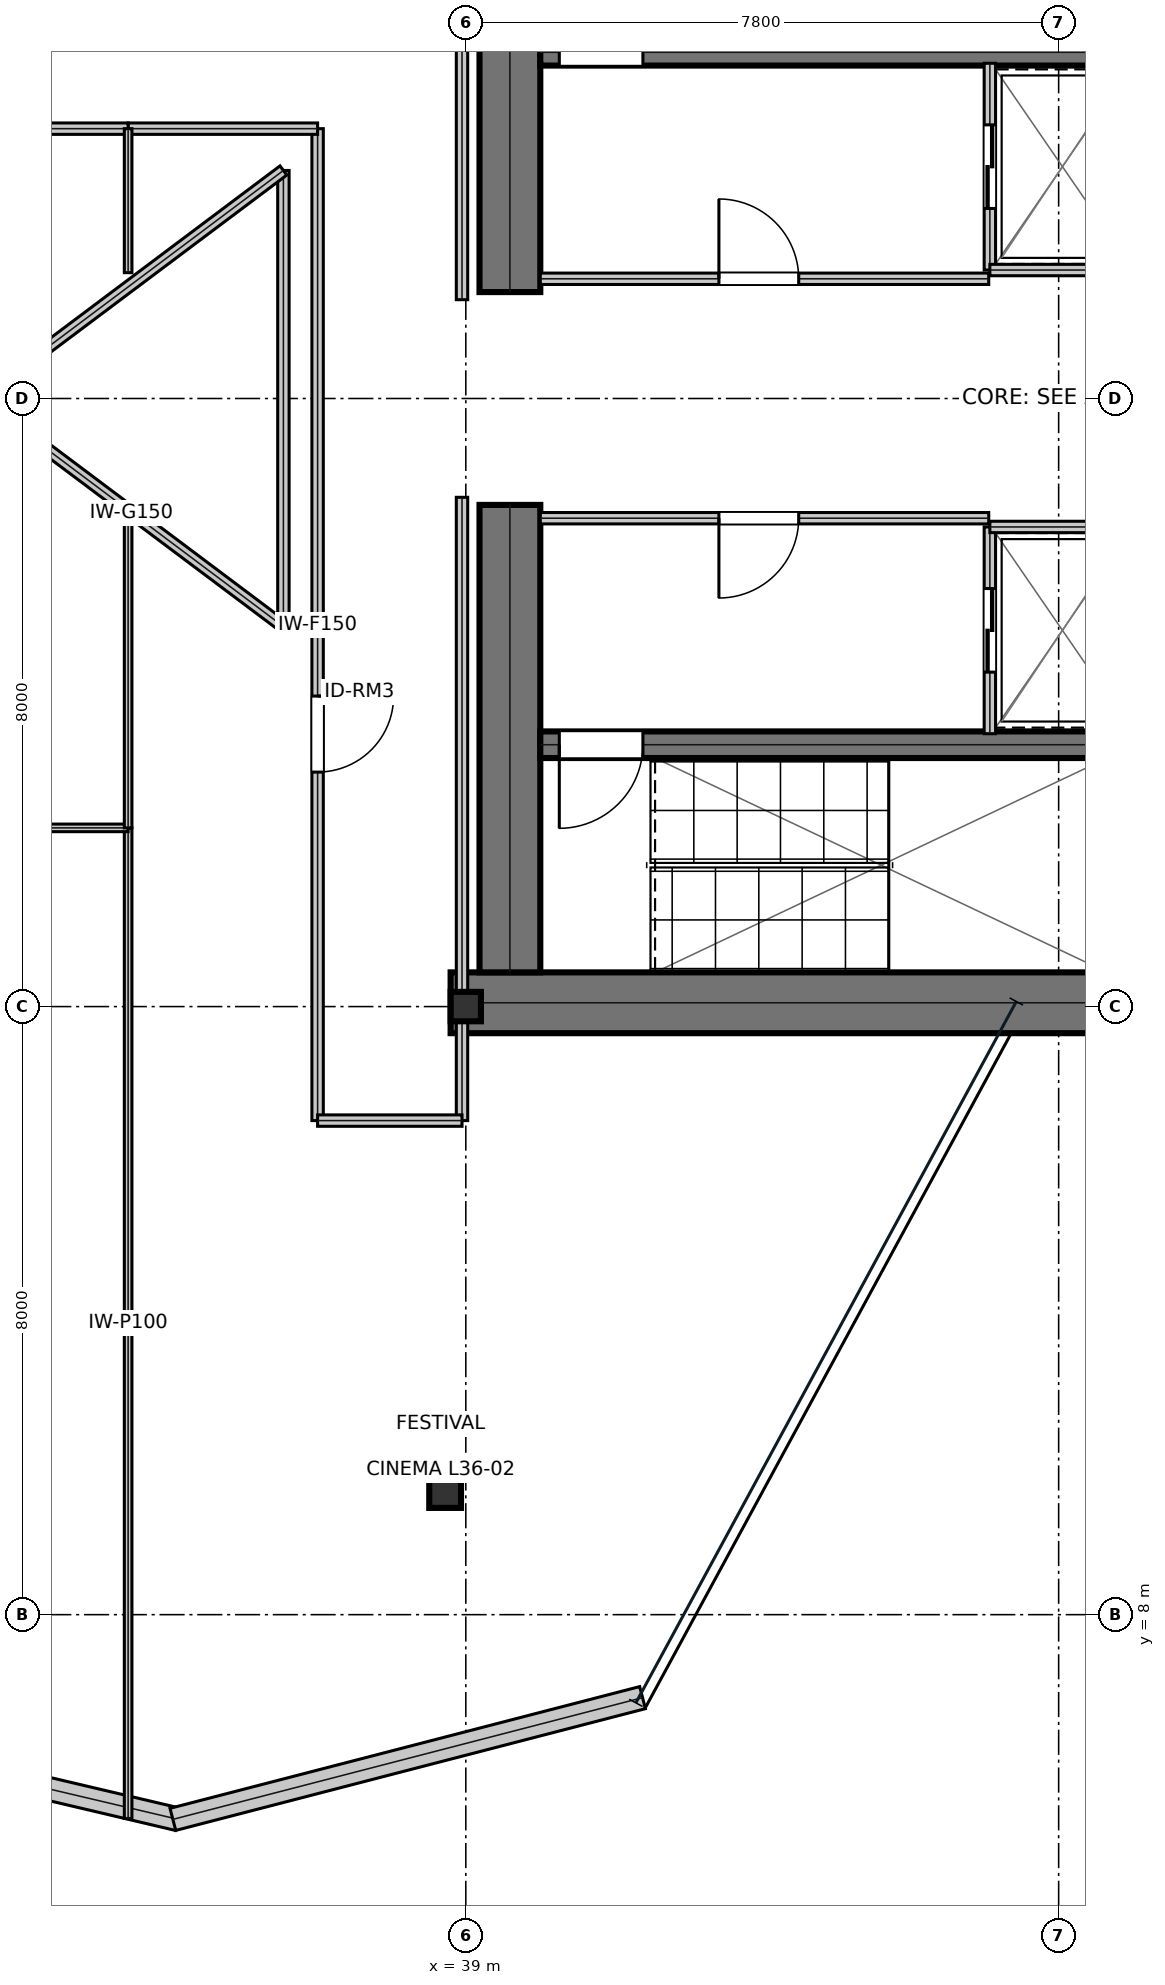
"""IFC4 building model, lengths in metres.
Left out: names, types, materials, properties, quantities, classifications, styles, units other than length and angle.
Written with IfcOpenShell. Run it as: python <this file> out.ifc"""

import sys

from ifc_helpers import new_model, si_unit, direction, frame, frame_2d, origin, origin_2d, place, context, subcontext, project, spatial, rectangle, i_section, extrude, element, fill, save


model = new_model("IFC4")
c1 = context("Model", 3, precision=1e-05, world=origin(), true_north=direction((0.0, 1.0)))
c2 = subcontext(c1, "Body", "Model", "MODEL_VIEW")
j1 = project(units=[si_unit("LENGTHUNIT", "METRE"), si_unit("PLANEANGLEUNIT", "RADIAN")], contexts=[c1])
p1 = place(None, origin())
s1 = spatial("IfcSite", under=j1, at=p1, CompositionType="ELEMENT")
p2 = place(p1, origin())
s2 = spatial("IfcBuilding", under=s1, at=p2, CompositionType="ELEMENT")
p3 = place(p2, frame((0.0, 0.0, 157.35)))
s3 = spatial("IfcBuildingStorey", under=s2, at=p3, CompositionType="ELEMENT", Elevation=157.35)
p4 = place(p3, frame((38.8, 16.05, 0.0), z_axis=(0.0, 0.0, 1.0), x_axis=(1.0, 0.0, 0.0)))
e1 = element("IfcWall", 1, at=p4, inside=s3, PredefinedType="SHEAR", context=c2, shape_type="SweptSolid", body=[
    extrude(rectangle(XDim=16.0, YDim=0.8, at=frame_2d((8.0, 0.0))), origin(), (0.0, 0.0, 1.0), 3.81),
])
for number, where, z_axis, x_axis in (
    (2, (39.58, 16.45, 0.0), (0.0, 0.0, 1.0), (0.0, 1.0, 0.0)),
    (3, (39.58, 25.4, 0.0), (0.0, 0.0, 1.0), (0.0, 1.0, 0.0)),
):
    element("IfcWall", number, at=place(p3, frame(where, z_axis=z_axis, x_axis=x_axis)), inside=s3, PredefinedType="SHEAR", context=c2, shape_type="SweptSolid", body=[
        extrude(rectangle(XDim=6.15, YDim=0.8, at=frame_2d((3.075, 0.0))), origin(), (0.0, 0.0, 1.0), 3.81),
    ])
p5 = place(p3, frame((39.98, 28.555, 0.0), z_axis=(0.0, 0.0, 1.0), x_axis=(1.0, 0.0, 0.0)))
e4 = element("IfcWall", 4, at=p5, inside=s3, PredefinedType="SHEAR", context=c2, shape_type="SweptSolid", body=[
    extrude(rectangle(XDim=7.71, YDim=0.35, at=frame_2d((3.855, 0.0))), origin(), (0.0, 0.0, 1.0), 3.81),
])
p6 = place(p5, frame((0.25, 0.0, 0.0)))
e5 = element("IfcOpeningElement", 5, at=p6, cuts=e4, PredefinedType="OPENING", context=c2, shape_type="SweptSolid", body=[
    extrude(rectangle(XDim=1.1, YDim=2.15, at=frame_2d((0.55, 1.075))), frame((0.0, 0.185, 0.0), z_axis=(0.0, -1.0, 0.0), x_axis=(1.0, 0.0, 0.0)), (0.0, 0.0, 1.0), 0.37),
])
p7 = place(p3, frame((39.98, 19.445, 0.0), z_axis=(0.0, 0.0, 1.0), x_axis=(1.0, 0.0, 0.0)))
e6 = element("IfcWall", 6, at=p7, inside=s3, PredefinedType="SHEAR", context=c2, shape_type="SweptSolid", body=[
    extrude(rectangle(XDim=7.71, YDim=0.35, at=frame_2d((3.855, 0.0))), origin(), (0.0, 0.0, 1.0), 3.81),
])
p8 = place(p7, frame((0.25, 0.0, 0.0)))
e7 = element("IfcOpeningElement", 7, at=p8, cuts=e6, PredefinedType="OPENING", context=c2, shape_type="SweptSolid", body=[
    extrude(rectangle(XDim=1.1, YDim=2.15, at=frame_2d((0.55, 1.075))), frame((0.0, 0.185, 0.0), z_axis=(0.0, -1.0, 0.0), x_axis=(1.0, 0.0, 0.0)), (0.0, 0.0, 1.0), 0.37),
])
p9 = place(p3, frame((39.0, 16.0, 0.0), z_axis=(0.0, 0.0, 1.0), x_axis=(1.0, 0.0, 0.0)))
e8 = element("IfcColumn", 8, at=p9, inside=s3, PredefinedType="COLUMN", context=c2, shape_type="SweptSolid", body=[
    extrude(i_section(OverallWidth=0.398, OverallDepth=0.387, WebThickness=0.021, FlangeThickness=0.033, at=origin_2d()), origin(), (0.0, 0.0, 1.0), 4.044),
])
p10 = place(p3, frame((38.728, 9.632, 0.016), z_axis=(-0.004494627579, 0.026846289054, 0.999629468897), x_axis=(-0.986273042842, -0.165122636132, 0.0)))
e9 = element("IfcColumn", 9, at=p10, inside=s3, PredefinedType="COLUMN", context=c2, shape_type="SweptSolid", body=[
    extrude(i_section(OverallWidth=0.418, OverallDepth=0.455, WebThickness=0.042, FlangeThickness=0.068, at=origin_2d()), origin(), (0.0, 0.0, 1.0), 4.02),
])
p11 = place(p3, frame((29.033, 6.763, 0.0), z_axis=(0.0, 0.0, 1.0), x_axis=(0.973355101444, -0.229302957882, 0.0)))
e10 = element("IfcWall", 10, at=p11, inside=s3, PredefinedType="STANDARD", context=c2, shape_type="SweptSolid", body=[
    extrude(rectangle(XDim=6.349, YDim=0.3, at=frame_2d((3.174, 0.0))), origin(), (0.0, 0.0, 1.0), 3.81),
])
p12 = place(p3, frame((35.146, 5.307, 0.0), z_axis=(0.0, 0.0, 1.0), x_axis=(0.96801891639, 0.250877216005, 0.0)))
e11 = element("IfcWall", 11, at=p12, inside=s3, PredefinedType="STANDARD", context=c2, shape_type="SweptSolid", body=[
    extrude(rectangle(XDim=6.384, YDim=0.3, at=frame_2d((3.192, 0.0))), origin(), (0.0, 0.0, 1.0), 3.81),
])
p13 = place(p3, frame((39.98, 25.575, 0.0), z_axis=(0.0, 0.0, 1.0), x_axis=(1.0, 0.0, 0.0)))
e12 = element("IfcWall", 12, at=p13, inside=s3, PredefinedType="PARTITIONING", context=c2, shape_type="SweptSolid", body=[
    extrude(rectangle(XDim=5.9, YDim=0.15, at=frame_2d((2.95, 0.0))), origin(), (0.0, 0.0, 1.0), 3.81),
])
p14 = place(p13, frame((2.35, 0.0, 0.0)))
e13 = element("IfcOpeningElement", 13, at=p14, cuts=e12, PredefinedType="OPENING", context=c2, shape_type="SweptSolid", body=[
    extrude(rectangle(XDim=1.05, YDim=2.15, at=frame_2d((0.525, 1.075))), frame((0.0, 0.085, 0.0), z_axis=(0.0, -1.0, 0.0), x_axis=(1.0, 0.0, 0.0)), (0.0, 0.0, 1.0), 0.17),
])
p15 = place(p3, frame((39.98, 22.425, 0.0), z_axis=(0.0, 0.0, 1.0), x_axis=(1.0, 0.0, 0.0)))
e14 = element("IfcWall", 14, at=p15, inside=s3, PredefinedType="PARTITIONING", context=c2, shape_type="SweptSolid", body=[
    extrude(rectangle(XDim=5.9, YDim=0.15, at=frame_2d((2.95, 0.0))), origin(), (0.0, 0.0, 1.0), 3.81),
])
p16 = place(p15, frame((2.35, 0.0, 0.0)))
e15 = element("IfcOpeningElement", 15, at=p16, cuts=e14, PredefinedType="OPENING", context=c2, shape_type="SweptSolid", body=[
    extrude(rectangle(XDim=1.05, YDim=2.15, at=frame_2d((0.525, 1.075))), frame((0.0, 0.085, 0.0), z_axis=(0.0, -1.0, 0.0), x_axis=(1.0, 0.0, 0.0)), (0.0, 0.0, 1.0), 0.17),
])
p17 = place(p3, frame((45.895, 25.69, 0.0), z_axis=(0.0, 0.0, 1.0), x_axis=(0.0, 1.0, 0.0)))
e16 = element("IfcWall", 16, at=p17, inside=s3, PredefinedType="PARTITIONING", context=c2, shape_type="SweptSolid", body=[
    extrude(rectangle(XDim=2.72, YDim=0.15, at=frame_2d((1.36, 0.0))), origin(), (0.0, 0.0, 1.0), 3.81),
])
p18 = place(p17, frame((0.81, 0.0, 0.0)))
e17 = element("IfcOpeningElement", 17, at=p18, cuts=e16, PredefinedType="OPENING", context=c2, shape_type="SweptSolid", body=[
    extrude(rectangle(XDim=1.1, YDim=2.15, at=frame_2d((0.55, 1.075))), frame((0.0, 0.085, 0.0), z_axis=(0.0, -1.0, 0.0), x_axis=(1.0, 0.0, 0.0)), (0.0, 0.0, 1.0), 0.17),
])
p19 = place(p3, frame((45.895, 25.69, 0.0), z_axis=(0.0, 0.0, 1.0), x_axis=(1.0, 0.0, 0.0)))
e18 = element("IfcWall", 18, at=p19, inside=s3, PredefinedType="PARTITIONING", context=c2, shape_type="SweptSolid", body=[
    extrude(rectangle(XDim=1.915, YDim=0.15, at=frame_2d((0.958, 0.0))), origin(), (0.0, 0.0, 1.0), 3.81),
])
p20 = place(p3, frame((45.895, 19.59, 0.0), z_axis=(0.0, 0.0, 1.0), x_axis=(0.0, 1.0, 0.0)))
e19 = element("IfcWall", 19, at=p20, inside=s3, PredefinedType="PARTITIONING", context=c2, shape_type="SweptSolid", body=[
    extrude(rectangle(XDim=2.72, YDim=0.15, at=frame_2d((1.36, 0.0))), origin(), (0.0, 0.0, 1.0), 3.81),
])
p21 = place(p20, frame((0.81, 0.0, 0.0)))
e20 = element("IfcOpeningElement", 20, at=p21, cuts=e19, PredefinedType="OPENING", context=c2, shape_type="SweptSolid", body=[
    extrude(rectangle(XDim=1.1, YDim=2.15, at=frame_2d((0.55, 1.075))), frame((0.0, 0.085, 0.0), z_axis=(0.0, -1.0, 0.0), x_axis=(1.0, 0.0, 0.0)), (0.0, 0.0, 1.0), 0.17),
])
p22 = place(p3, frame((45.895, 22.31, 0.0), z_axis=(0.0, 0.0, 1.0), x_axis=(1.0, 0.0, 0.0)))
e21 = element("IfcWall", 21, at=p22, inside=s3, PredefinedType="PARTITIONING", context=c2, shape_type="SweptSolid", body=[
    extrude(rectangle(XDim=1.915, YDim=0.15, at=frame_2d((0.958, 0.0))), origin(), (0.0, 0.0, 1.0), 3.81),
])
p23 = place(p3, frame((37.05, 14.5, 0.0), z_axis=(0.0, 0.0, 1.0), x_axis=(0.0, 1.0, 0.0)))
e22 = element("IfcWall", 22, at=p23, inside=s3, PredefinedType="PARTITIONING", context=c2, shape_type="SweptSolid", body=[
    extrude(rectangle(XDim=13.05, YDim=0.15, at=frame_2d((6.525, 0.0))), origin(), (0.0, 0.0, 1.0), 3.19),
])
p24 = place(p23, frame((4.585, 0.0, 0.0)))
e23 = element("IfcOpeningElement", 23, at=p24, cuts=e22, PredefinedType="OPENING", context=c2, shape_type="SweptSolid", body=[
    extrude(rectangle(XDim=1.0, YDim=2.15, at=frame_2d((0.5, 1.075))), frame((0.0, 0.085, 0.0), z_axis=(0.0, -1.0, 0.0), x_axis=(1.0, 0.0, 0.0)), (0.0, 0.0, 1.0), 0.17),
])
p25 = place(p3, frame((38.95, 14.5, 0.0), z_axis=(0.0, 0.0, 1.0), x_axis=(0.0, 1.0, 0.0)))
e24 = element("IfcWall", 24, at=p25, inside=s3, PredefinedType="PARTITIONING", context=c2, shape_type="SweptSolid", body=[
    extrude(rectangle(XDim=8.2, YDim=0.15, at=frame_2d((4.1, 0.0))), origin(), (0.0, 0.0, 1.0), 3.19),
])
p26 = place(p3, frame((34.557, 27.55, 0.0), z_axis=(0.0, 0.0, 1.0), x_axis=(1.0, 0.0, 0.0)))
e25 = element("IfcWall", 25, at=p26, inside=s3, PredefinedType="PARTITIONING", context=c2, shape_type="SweptSolid", body=[
    extrude(rectangle(XDim=2.493, YDim=0.15, at=frame_2d((1.247, 0.0))), origin(), (0.0, 0.0, 1.0), 3.443),
])
p27 = place(p3, frame((37.05, 14.5, 0.0), z_axis=(0.0, 0.0, 1.0), x_axis=(1.0, 0.0, 0.0)))
e26 = element("IfcWall", 26, at=p27, inside=s3, PredefinedType="PARTITIONING", context=c2, shape_type="SweptSolid", body=[
    extrude(rectangle(XDim=1.9, YDim=0.15, at=frame_2d((0.95, 0.0))), origin(), (0.0, 0.0, 1.0), 3.19),
])
p28 = place(p3, frame((29.4, 27.55, 0.0), z_axis=(0.0, 0.0, 1.0), x_axis=(1.0, 0.0, 0.0)))
e27 = element("IfcWall", 27, at=p28, inside=s3, PredefinedType="PARTITIONING", context=c2, shape_type="SweptSolid", body=[
    extrude(rectangle(XDim=5.157, YDim=0.15, at=frame_2d((2.579, 0.0))), origin(), (0.0, 0.0, 1.0), 3.19),
])
p29 = place(p3, frame((38.95, 25.3, 0.0), z_axis=(0.0, 0.0, 1.0), x_axis=(0.0, 1.0, 0.0)))
e28 = element("IfcWall", 28, at=p29, inside=s3, PredefinedType="PARTITIONING", context=c2, shape_type="SweptSolid", body=[
    extrude(rectangle(XDim=8.2, YDim=0.15, at=frame_2d((4.1, 0.0))), origin(), (0.0, 0.0, 1.0), 3.19),
])
p30 = place(p3, frame((34.557, 5.318, 0.0), z_axis=(0.0, 0.0, 1.0), x_axis=(0.0, 1.0, 0.0)))
e29 = element("IfcWall", 29, at=p30, inside=s3, PredefinedType="PARTITIONING", context=c2, shape_type="SweptSolid", body=[
    extrude(rectangle(XDim=13.033, YDim=0.1, at=frame_2d((6.517, 0.0))), origin(), (0.0, 0.0, 1.0), 3.19),
])
p31 = place(p3, frame((29.4, 18.351, 0.0), z_axis=(0.0, 0.0, 1.0), x_axis=(1.0, 0.0, 0.0)))
e30 = element("IfcWall", 30, at=p31, inside=s3, PredefinedType="PARTITIONING", context=c2, shape_type="SweptSolid", body=[
    extrude(rectangle(XDim=5.157, YDim=0.1, at=frame_2d((2.579, 0.0))), origin(), (0.0, 0.0, 1.0), 3.19),
])
p32 = place(p3, frame((34.557, 18.351, 0.0), z_axis=(0.0, 0.0, 1.0), x_axis=(0.0, 1.0, 0.0)))
e31 = element("IfcWall", 31, at=p32, inside=s3, PredefinedType="PARTITIONING", context=c2, shape_type="SweptSolid", body=[
    extrude(rectangle(XDim=3.994, YDim=0.1, at=frame_2d((1.997, 0.0))), origin(), (0.0, 0.0, 1.0), 3.81),
])
p33 = place(p3, frame((34.557, 25.655, 0.0), z_axis=(0.0, 0.0, 1.0), x_axis=(0.0, 1.0, 0.0)))
e32 = element("IfcWall", 32, at=p33, inside=s3, PredefinedType="PARTITIONING", context=c2, shape_type="SweptSolid", body=[
    extrude(rectangle(XDim=1.895, YDim=0.1, at=frame_2d((0.947, 0.0))), origin(), (0.0, 0.0, 1.0), 3.81),
])
p34 = place(p3, frame((32.6, 24.0, 0.0), z_axis=(0.0, 0.0, 1.0), x_axis=(0.8, -0.6, 0.0)))
e33 = element("IfcWall", 33, at=p34, inside=s3, PredefinedType="MOVABLE", context=c2, shape_type="SweptSolid", body=[
    extrude(rectangle(XDim=5.0, YDim=0.15, at=frame_2d((2.5, 0.0))), origin(), (0.0, 0.0, 1.0), 3.81),
])
p35 = place(p3, frame((36.6, 21.0, 0.0), z_axis=(0.0, 0.0, 1.0), x_axis=(0.0, 1.0, 0.0)))
e34 = element("IfcWall", 34, at=p35, inside=s3, PredefinedType="MOVABLE", context=c2, shape_type="SweptSolid", body=[
    extrude(rectangle(XDim=6.0, YDim=0.15, at=frame_2d((3.0, 0.0))), origin(), (0.0, 0.0, 1.0), 3.81),
])
p36 = place(p3, frame((36.6, 27.0, 0.0), z_axis=(0.0, 0.0, 1.0), x_axis=(-0.8, -0.6, 0.0)))
e35 = element("IfcWall", 35, at=p36, inside=s3, PredefinedType="MOVABLE", context=c2, shape_type="SweptSolid", body=[
    extrude(rectangle(XDim=5.0, YDim=0.15, at=frame_2d((2.5, 0.0))), origin(), (0.0, 0.0, 1.0), 3.81),
])
p37 = place(p14, origin())
e36 = element("IfcDoor", 36, at=p37, inside=s3, OperationType="SINGLE_SWING_LEFT", PredefinedType="DOOR", context=c2, shape_type="SweptSolid", body=[
    extrude(rectangle(XDim=1.05, YDim=2.15, at=frame_2d((0.525, 1.075))), frame((0.0, 0.025, 0.0), z_axis=(0.0, -1.0, 0.0), x_axis=(1.0, 0.0, 0.0)), (0.0, 0.0, 1.0), 0.05),
])
fill(e13, e36)
p38 = place(p16, frame((1.05, 0.0, 0.0), z_axis=(0.0, 0.0, 1.0), x_axis=(-1.0, 0.0, 0.0)))
e37 = element("IfcDoor", 37, at=p38, inside=s3, OperationType="SINGLE_SWING_RIGHT", PredefinedType="DOOR", context=c2, shape_type="SweptSolid", body=[
    extrude(rectangle(XDim=1.05, YDim=2.15, at=frame_2d((0.525, 1.075))), frame((0.0, 0.025, 0.0), z_axis=(0.0, -1.0, 0.0), x_axis=(1.0, 0.0, 0.0)), (0.0, 0.0, 1.0), 0.05),
])
fill(e15, e37)
p39 = place(p18, frame((1.1, 0.0, 0.0), z_axis=(0.0, 0.0, 1.0), x_axis=(-1.0, 0.0, 0.0)))
e38 = element("IfcDoor", 38, at=p39, inside=s3, OperationType="DOUBLE_DOOR_SLIDING", PredefinedType="DOOR", context=c2, shape_type="SweptSolid", body=[
    extrude(rectangle(XDim=1.1, YDim=2.15, at=frame_2d((0.55, 1.075))), frame((0.0, 0.025, 0.0), z_axis=(0.0, -1.0, 0.0), x_axis=(1.0, 0.0, 0.0)), (0.0, 0.0, 1.0), 0.05),
])
fill(e17, e38)
p40 = place(p21, frame((1.1, 0.0, 0.0), z_axis=(0.0, 0.0, 1.0), x_axis=(-1.0, 0.0, 0.0)))
e39 = element("IfcDoor", 39, at=p40, inside=s3, OperationType="DOUBLE_DOOR_SLIDING", PredefinedType="DOOR", context=c2, shape_type="SweptSolid", body=[
    extrude(rectangle(XDim=1.1, YDim=2.15, at=frame_2d((0.55, 1.075))), frame((0.0, 0.025, 0.0), z_axis=(0.0, -1.0, 0.0), x_axis=(1.0, 0.0, 0.0)), (0.0, 0.0, 1.0), 0.05),
])
fill(e20, e39)
p41 = place(p24, frame((1.0, 0.0, 0.0), z_axis=(0.0, 0.0, 1.0), x_axis=(-1.0, 0.0, 0.0)))
e40 = element("IfcDoor", 40, at=p41, inside=s3, OperationType="SINGLE_SWING_LEFT", PredefinedType="DOOR", context=c2, shape_type="SweptSolid", body=[
    extrude(rectangle(XDim=1.0, YDim=2.15, at=frame_2d((0.5, 1.075))), frame((0.0, 0.025, 0.0), z_axis=(0.0, -1.0, 0.0), x_axis=(1.0, 0.0, 0.0)), (0.0, 0.0, 1.0), 0.05),
])
fill(e23, e40)
p42 = place(p6, origin())
e41 = element("IfcDoor", 41, at=p42, inside=s3, OperationType="SINGLE_SWING_LEFT", PredefinedType="DOOR", context=c2, shape_type="SweptSolid", body=[
    extrude(rectangle(XDim=1.1, YDim=2.15, at=frame_2d((0.55, 1.075))), frame((0.0, 0.025, 0.0), z_axis=(0.0, -1.0, 0.0), x_axis=(1.0, 0.0, 0.0)), (0.0, 0.0, 1.0), 0.05),
])
fill(e5, e41)
p43 = place(p8, frame((1.1, 0.0, 0.0), z_axis=(0.0, 0.0, 1.0), x_axis=(-1.0, 0.0, 0.0)))
e42 = element("IfcDoor", 42, at=p43, inside=s3, OperationType="SINGLE_SWING_RIGHT", PredefinedType="DOOR", context=c2, shape_type="SweptSolid", body=[
    extrude(rectangle(XDim=1.1, YDim=2.15, at=frame_2d((0.55, 1.075))), frame((0.0, 0.025, 0.0), z_axis=(0.0, -1.0, 0.0), x_axis=(1.0, 0.0, 0.0)), (0.0, 0.0, 1.0), 0.05),
])
fill(e7, e42)
save(model, sys.argv[1])
